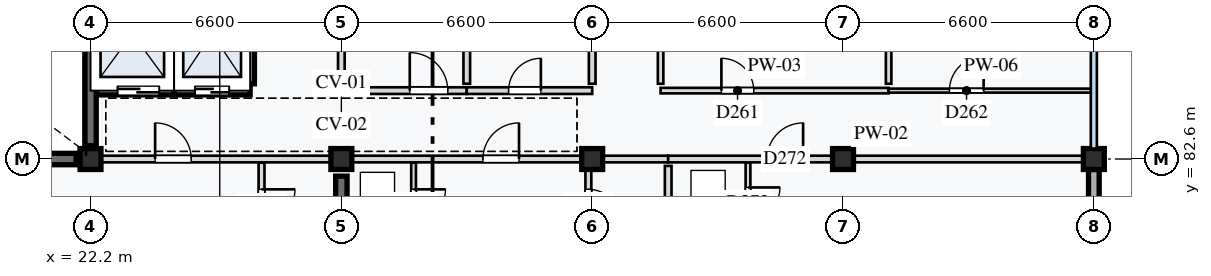
"""IFC4 building model, lengths in metres.
Left out: names, types, materials, properties, quantities, classifications, styles, units other than length and angle.
Written with IfcOpenShell. Run it as: python <this file> out.ifc"""

import sys

from ifc_helpers import new_model, si_unit, direction, frame, frame_2d, origin, origin_2d, place, context, subcontext, project, spatial, rectangle, extrude, element, fill, save


model = new_model("IFC4")
c1 = context("Model", 3, precision=1e-05, world=origin(), true_north=direction((0.0, 1.0)))
c2 = subcontext(c1, "Body", "Model", "MODEL_VIEW")
j1 = project(units=[si_unit("LENGTHUNIT", "METRE"), si_unit("PLANEANGLEUNIT", "RADIAN")], contexts=[c1])
p1 = place(None, origin())
s1 = spatial("IfcSite", under=j1, at=p1, CompositionType="ELEMENT")
p2 = place(p1, origin())
s2 = spatial("IfcBuilding", under=s1, at=p2, CompositionType="ELEMENT")
p3 = place(p2, frame((0.0, 0.0, 27.6)))
s3 = spatial("IfcBuildingStorey", under=s2, at=p3, CompositionType="ELEMENT", Elevation=27.6)
for number, where, z_axis, x_axis in (
    (1, (22.2, 82.6, 0.0), (0.0, 0.0, 1.0), (1.0, 0.0, 0.0)),
    (2, (28.8, 82.6, 0.0), (0.0, 0.0, 1.0), (1.0, 0.0, 0.0)),
    (3, (35.4, 82.6, 0.0), (0.0, 0.0, 1.0), (1.0, 0.0, 0.0)),
    (4, (42.0, 82.6, 0.0), (0.0, 0.0, 1.0), (1.0, 0.0, 0.0)),
    (5, (48.6, 82.6, 0.0), (0.0, 0.0, 1.0), (1.0, 0.0, 0.0)),
):
    element("IfcColumn", number, at=place(p3, frame(where, z_axis=z_axis, x_axis=x_axis)), inside=s3, PredefinedType="COLUMN", context=c2, shape_type="SweptSolid", body=[
        extrude(rectangle(XDim=0.55, YDim=0.55, at=origin_2d()), origin(), (0.0, 0.0, 1.0), 3.2),
    ])
p4 = place(p3, frame((15.98, 82.6, 0.0), z_axis=(0.0, 0.0, 1.0), x_axis=(1.0, 0.0, 0.0)))
e6 = element("IfcWall", 6, at=p4, inside=s3, PredefinedType="SHEAR", context=c2, shape_type="SweptSolid", body=[
    extrude(rectangle(XDim=5.84, YDim=0.3, at=frame_2d((2.92, 0.0))), origin(), (0.0, 0.0, 1.0), 2.97),
])
p5 = place(p3, frame((22.2, 82.95, 0.0), z_axis=(0.0, 0.0, 1.0), x_axis=(0.0, 1.0, 0.0)))
e7 = element("IfcWall", 7, at=p5, inside=s3, PredefinedType="SHEAR", context=c2, shape_type="SweptSolid", body=[
    extrude(rectangle(XDim=2.8, YDim=0.3, at=frame_2d((1.4, 0.0))), origin(), (0.0, 0.0, 1.0), 2.97),
])
p6 = place(p3, frame((28.8, 76.45, 0.0), z_axis=(0.0, 0.0, 1.0), x_axis=(0.0, 1.0, 0.0)))
e8 = element("IfcWall", 8, at=p6, inside=s3, PredefinedType="SHEAR", context=c2, shape_type="SweptSolid", body=[
    extrude(rectangle(XDim=5.7, YDim=0.3, at=frame_2d((2.85, 0.0))), origin(), (0.0, 0.0, 1.0), 2.97),
])
p7 = place(p3, frame((48.6, 76.275, 0.0), z_axis=(0.0, 0.0, 1.0), x_axis=(0.0, 1.0, 0.0)))
e9 = element("IfcWall", 9, at=p7, inside=s3, PredefinedType="STANDARD", context=c2, shape_type="SweptSolid", body=[
    extrude(rectangle(XDim=6.05, YDim=0.28, at=frame_2d((3.025, 0.0))), origin(), (0.0, 0.0, 1.0), 2.65),
])
p8 = place(p3, frame((22.36, 84.4, 0.0), z_axis=(0.0, 0.0, 1.0), x_axis=(1.0, 0.0, 0.0)))
e10 = element("IfcWall", 10, at=p8, inside=s3, PredefinedType="STANDARD", context=c2, shape_type="SweptSolid", body=[
    extrude(rectangle(XDim=2.04, YDim=0.225, at=frame_2d((1.02, 0.0))), origin(), (0.0, 0.0, 1.0), 2.97),
])
p9 = place(p8, frame((0.55, 0.0, 0.0)))
e11 = element("IfcOpeningElement", 11, at=p9, cuts=e10, PredefinedType="OPENING", context=c2, shape_type="SweptSolid", body=[
    extrude(rectangle(XDim=1.1, YDim=2.1, at=frame_2d((0.55, 1.05))), frame((0.0, 0.123, 0.0), z_axis=(0.0, -1.0, 0.0), x_axis=(1.0, 0.0, 0.0)), (0.0, 0.0, 1.0), 0.245),
])
p10 = place(p3, frame((24.4, 84.4, 0.0), z_axis=(0.0, 0.0, 1.0), x_axis=(1.0, 0.0, 0.0)))
e12 = element("IfcWall", 12, at=p10, inside=s3, PredefinedType="STANDARD", context=c2, shape_type="SweptSolid", body=[
    extrude(rectangle(XDim=2.0, YDim=0.225, at=frame_2d((1.0, 0.0))), origin(), (0.0, 0.0, 1.0), 2.97),
])
p11 = place(p10, frame((0.55, 0.0, 0.0)))
e13 = element("IfcOpeningElement", 13, at=p11, cuts=e12, PredefinedType="OPENING", context=c2, shape_type="SweptSolid", body=[
    extrude(rectangle(XDim=0.9, YDim=2.1, at=frame_2d((0.45, 1.05))), frame((0.0, 0.123, 0.0), z_axis=(0.0, -1.0, 0.0), x_axis=(1.0, 0.0, 0.0)), (0.0, 0.0, 1.0), 0.245),
])
for number, where, z_axis, x_axis in (
    (14, (24.4, 84.58, 0.0), (0.0, 0.0, 1.0), (0.0, 1.0, 0.0)),
    (15, (26.4, 84.58, 0.0), (0.0, 0.0, 1.0), (0.0, 1.0, 0.0)),
):
    element("IfcWall", number, at=place(p3, frame(where, z_axis=z_axis, x_axis=x_axis)), inside=s3, PredefinedType="STANDARD", context=c2, shape_type="SweptSolid", body=[
        extrude(rectangle(XDim=2.64, YDim=0.225, at=frame_2d((1.32, 0.0))), origin(), (0.0, 0.0, 1.0), 2.97),
    ])
p12 = place(p3, frame((28.8, 84.4, 0.0), z_axis=(0.0, 0.0, 1.0), x_axis=(1.0, 0.0, 0.0)))
e16 = element("IfcWall", 16, at=p12, inside=s3, PredefinedType="PARTITIONING", context=c2, shape_type="SweptSolid", body=[
    extrude(rectangle(XDim=3.3, YDim=0.175, at=frame_2d((1.65, 0.0))), origin(), (0.0, 0.0, 1.0), 2.97),
])
p13 = place(p12, frame((1.8, 0.0, 0.0)))
e17 = element("IfcOpeningElement", 17, at=p13, cuts=e16, PredefinedType="OPENING", context=c2, shape_type="SweptSolid", body=[
    extrude(rectangle(XDim=1.0, YDim=2.16, at=frame_2d((0.5, 1.08))), frame((0.0, 0.097, 0.0), z_axis=(0.0, -1.0, 0.0), x_axis=(1.0, 0.0, 0.0)), (0.0, 0.0, 1.0), 0.195),
])
p14 = place(p3, frame((32.1, 84.4, 0.0), z_axis=(0.0, 0.0, 1.0), x_axis=(1.0, 0.0, 0.0)))
e18 = element("IfcWall", 18, at=p14, inside=s3, PredefinedType="PARTITIONING", context=c2, shape_type="SweptSolid", body=[
    extrude(rectangle(XDim=3.3, YDim=0.175, at=frame_2d((1.65, 0.0))), origin(), (0.0, 0.0, 1.0), 2.97),
])
p15 = place(p14, frame((1.1, 0.0, 0.0)))
e19 = element("IfcOpeningElement", 19, at=p15, cuts=e18, PredefinedType="OPENING", context=c2, shape_type="SweptSolid", body=[
    extrude(rectangle(XDim=0.85, YDim=2.0, at=frame_2d((0.425, 1.0))), frame((0.0, 0.097, 0.0), z_axis=(0.0, -1.0, 0.0), x_axis=(1.0, 0.0, 0.0)), (0.0, 0.0, 1.0), 0.195),
])
for number, where, z_axis, x_axis in (
    (20, (28.8, 84.58, 0.0), (0.0, 0.0, 1.0), (0.0, 1.0, 0.0)),
    (21, (32.1, 84.58, 0.0), (0.0, 0.0, 1.0), (0.0, 1.0, 0.0)),
    (22, (35.4, 84.58, 0.0), (0.0, 0.0, 1.0), (0.0, 1.0, 0.0)),
):
    element("IfcWall", number, at=place(p3, frame(where, z_axis=z_axis, x_axis=x_axis)), inside=s3, PredefinedType="PARTITIONING", context=c2, shape_type="SweptSolid", body=[
        extrude(rectangle(XDim=1.14, YDim=0.175, at=frame_2d((0.57, 0.0))), origin(), (0.0, 0.0, 1.0), 2.97),
    ])
p16 = place(p3, frame((37.2, 84.4, 0.0), z_axis=(0.0, 0.0, 1.0), x_axis=(1.0, 0.0, 0.0)))
e23 = element("IfcWall", 23, at=p16, inside=s3, PredefinedType="PARTITIONING", context=c2, shape_type="SweptSolid", body=[
    extrude(rectangle(XDim=6.0, YDim=0.145, at=frame_2d((3.0, 0.0))), origin(), (0.0, 0.0, 1.0), 2.97),
])
p17 = place(p16, frame((1.6, 0.0, 0.0)))
e24 = element("IfcOpeningElement", 24, at=p17, cuts=e23, PredefinedType="OPENING", context=c2, shape_type="SweptSolid", body=[
    extrude(rectangle(XDim=0.85, YDim=2.1, at=frame_2d((0.425, 1.05))), frame((0.0, 0.083, 0.0), z_axis=(0.0, -1.0, 0.0), x_axis=(1.0, 0.0, 0.0)), (0.0, 0.0, 1.0), 0.165),
])
p18 = place(p3, frame((43.2, 84.4, 0.0), z_axis=(0.0, 0.0, 1.0), x_axis=(1.0, 0.0, 0.0)))
e25 = element("IfcWall", 25, at=p18, inside=s3, PredefinedType="PARTITIONING", context=c2, shape_type="SweptSolid", body=[
    extrude(rectangle(XDim=5.4, YDim=0.105, at=frame_2d((2.7, 0.0))), origin(), (0.0, 0.0, 1.0), 2.97),
])
p19 = place(p18, frame((1.6, 0.0, 0.0)))
e26 = element("IfcOpeningElement", 26, at=p19, cuts=e25, PredefinedType="OPENING", context=c2, shape_type="SweptSolid", body=[
    extrude(rectangle(XDim=0.9, YDim=2.1, at=frame_2d((0.45, 1.05))), frame((0.0, 0.062, 0.0), z_axis=(0.0, -1.0, 0.0), x_axis=(1.0, 0.0, 0.0)), (0.0, 0.0, 1.0), 0.125),
])
for number, where, z_axis, x_axis in (
    (27, (43.2, 84.58, 0.0), (0.0, 0.0, 1.0), (0.0, 1.0, 0.0)),
    (28, (37.2, 84.58, 0.0), (0.0, 0.0, 1.0), (0.0, 1.0, 0.0)),
):
    element("IfcWall", number, at=place(p3, frame(where, z_axis=z_axis, x_axis=x_axis)), inside=s3, PredefinedType="PARTITIONING", context=c2, shape_type="SweptSolid", body=[
        extrude(rectangle(XDim=2.64, YDim=0.145, at=frame_2d((1.32, 0.0))), origin(), (0.0, 0.0, 1.0), 2.97),
    ])
p20 = place(p3, frame((22.2, 82.6, 0.0), z_axis=(0.0, 0.0, 1.0), x_axis=(1.0, 0.0, 0.0)))
e29 = element("IfcWall", 29, at=p20, inside=s3, PredefinedType="PARTITIONING", context=c2, shape_type="SweptSolid", body=[
    extrude(rectangle(XDim=6.6, YDim=0.175, at=frame_2d((3.3, 0.0))), origin(), (0.0, 0.0, 1.0), 2.55),
])
p21 = place(p20, frame((1.7, 0.0, 0.0)))
e30 = element("IfcOpeningElement", 30, at=p21, cuts=e29, PredefinedType="OPENING", context=c2, shape_type="SweptSolid", body=[
    extrude(rectangle(XDim=0.95, YDim=2.1, at=frame_2d((0.475, 1.05))), frame((0.0, 0.097, 0.0), z_axis=(0.0, -1.0, 0.0), x_axis=(1.0, 0.0, 0.0)), (0.0, 0.0, 1.0), 0.195),
])
p22 = place(p3, frame((26.7, 82.502, 0.0), z_axis=(0.0, 0.0, 1.0), x_axis=(0.0, -1.0, 0.0)))
e31 = element("IfcWall", 31, at=p22, inside=s3, PredefinedType="PARTITIONING", context=c2, shape_type="SweptSolid", body=[
    extrude(rectangle(XDim=2.302, YDim=0.155, at=frame_2d((1.151, 0.0))), origin(), (0.0, 0.0, 1.0), 2.97),
])
p23 = place(p22, frame((0.7, 0.0, 0.0)))
e32 = element("IfcOpeningElement", 32, at=p23, cuts=e31, PredefinedType="OPENING", context=c2, shape_type="SweptSolid", body=[
    extrude(rectangle(XDim=0.88, YDim=2.1, at=frame_2d((0.44, 1.05))), frame((0.0, 0.087, 0.0), z_axis=(0.0, -1.0, 0.0), x_axis=(1.0, 0.0, 0.0)), (0.0, 0.0, 1.0), 0.175),
])
p24 = place(p3, frame((28.8, 82.6, 0.0), z_axis=(0.0, 0.0, 1.0), x_axis=(1.0, 0.0, 0.0)))
e33 = element("IfcWall", 33, at=p24, inside=s3, PredefinedType="PARTITIONING", context=c2, shape_type="SweptSolid", body=[
    extrude(rectangle(XDim=8.6, YDim=0.175, at=frame_2d((4.3, 0.0))), origin(), (0.0, 0.0, 1.0), 2.55),
])
p25 = place(p24, frame((3.725, 0.0, 0.0)))
e34 = element("IfcOpeningElement", 34, at=p25, cuts=e33, PredefinedType="OPENING", context=c2, shape_type="SweptSolid", body=[
    extrude(rectangle(XDim=0.95, YDim=2.16, at=frame_2d((0.475, 1.08))), frame((0.0, 0.097, 0.0), z_axis=(0.0, -1.0, 0.0), x_axis=(1.0, 0.0, 0.0)), (0.0, 0.0, 1.0), 0.195),
])
p26 = place(p3, frame((30.7, 82.502, 0.0), z_axis=(0.0, 0.0, 1.0), x_axis=(0.0, -1.0, 0.0)))
e35 = element("IfcWall", 35, at=p26, inside=s3, PredefinedType="PARTITIONING", context=c2, shape_type="SweptSolid", body=[
    extrude(rectangle(XDim=2.302, YDim=0.125, at=frame_2d((1.151, 0.0))), origin(), (0.0, 0.0, 1.0), 2.97),
])
p27 = place(p26, frame((0.7, 0.0, 0.0)))
e36 = element("IfcOpeningElement", 36, at=p27, cuts=e35, PredefinedType="OPENING", context=c2, shape_type="SweptSolid", body=[
    extrude(rectangle(XDim=0.84, YDim=2.06, at=frame_2d((0.42, 1.03))), frame((0.0, 0.073, 0.0), z_axis=(0.0, -1.0, 0.0), x_axis=(1.0, 0.0, 0.0)), (0.0, 0.0, 1.0), 0.145),
])
p28 = place(p3, frame((35.3, 82.502, 0.0), z_axis=(0.0, 0.0, 1.0), x_axis=(0.0, -1.0, 0.0)))
e37 = element("IfcWall", 37, at=p28, inside=s3, PredefinedType="PARTITIONING", context=c2, shape_type="SweptSolid", body=[
    extrude(rectangle(XDim=2.302, YDim=0.155, at=frame_2d((1.151, 0.0))), origin(), (0.0, 0.0, 1.0), 2.97),
])
p29 = place(p28, frame((0.7, 0.0, 0.0)))
e38 = element("IfcOpeningElement", 38, at=p29, cuts=e37, PredefinedType="OPENING", context=c2, shape_type="SweptSolid", body=[
    extrude(rectangle(XDim=0.85, YDim=2.1, at=frame_2d((0.425, 1.05))), frame((0.0, 0.087, 0.0), z_axis=(0.0, -1.0, 0.0), x_axis=(1.0, 0.0, 0.0)), (0.0, 0.0, 1.0), 0.175),
])
p30 = place(p3, frame((37.4, 82.42, 0.0), z_axis=(0.0, 0.0, 1.0), x_axis=(0.0, -1.0, 0.0)))
e39 = element("IfcWall", 39, at=p30, inside=s3, PredefinedType="PARTITIONING", context=c2, shape_type="SweptSolid", body=[
    extrude(rectangle(XDim=2.132, YDim=0.175, at=frame_2d((1.066, 0.0))), origin(), (0.0, 0.0, 1.0), 2.97),
])
p31 = place(p3, frame((37.4, 82.6, 0.0), z_axis=(0.0, 0.0, 1.0), x_axis=(1.0, 0.0, 0.0)))
e40 = element("IfcWall", 40, at=p31, inside=s3, PredefinedType="PARTITIONING", context=c2, shape_type="SweptSolid", body=[
    extrude(rectangle(XDim=11.2, YDim=0.175, at=frame_2d((5.6, 0.0))), origin(), (0.0, 0.0, 1.0), 2.55),
])
p32 = place(p31, frame((2.6, 0.0, 0.0)))
e41 = element("IfcOpeningElement", 41, at=p32, cuts=e40, PredefinedType="OPENING", context=c2, shape_type="SweptSolid", body=[
    extrude(rectangle(XDim=0.95, YDim=2.16, at=frame_2d((0.475, 1.08))), frame((0.0, 0.097, 0.0), z_axis=(0.0, -1.0, 0.0), x_axis=(1.0, 0.0, 0.0)), (0.0, 0.0, 1.0), 0.195),
])
p33 = place(p3, frame((39.5, 82.502, 0.0), z_axis=(0.0, 0.0, 1.0), x_axis=(0.0, -1.0, 0.0)))
e42 = element("IfcWall", 42, at=p33, inside=s3, PredefinedType="PARTITIONING", context=c2, shape_type="SweptSolid", body=[
    extrude(rectangle(XDim=2.202, YDim=0.125, at=frame_2d((1.101, 0.0))), origin(), (0.0, 0.0, 1.0), 2.97),
])
p34 = place(p33, frame((0.65, 0.0, 0.0)))
e43 = element("IfcOpeningElement", 43, at=p34, cuts=e42, PredefinedType="OPENING", context=c2, shape_type="SweptSolid", body=[
    extrude(rectangle(XDim=0.84, YDim=2.06, at=frame_2d((0.42, 1.03))), frame((0.0, 0.073, 0.0), z_axis=(0.0, -1.0, 0.0), x_axis=(1.0, 0.0, 0.0)), (0.0, 0.0, 1.0), 0.145),
])
p35 = place(p9, origin())
e44 = element("IfcDoor", 44, at=p35, inside=s3, OperationType="DOUBLE_DOOR_SLIDING", PredefinedType="DOOR", context=c2, shape_type="SweptSolid", body=[
    extrude(rectangle(XDim=1.1, YDim=2.1, at=frame_2d((0.55, 1.05))), frame((0.0, 0.025, 0.0), z_axis=(0.0, -1.0, 0.0), x_axis=(1.0, 0.0, 0.0)), (0.0, 0.0, 1.0), 0.05),
])
fill(e11, e44)
p36 = place(p11, origin())
e45 = element("IfcDoor", 45, at=p36, inside=s3, OperationType="DOUBLE_DOOR_SLIDING", PredefinedType="DOOR", context=c2, shape_type="SweptSolid", body=[
    extrude(rectangle(XDim=0.9, YDim=2.1, at=frame_2d((0.45, 1.05))), frame((0.0, 0.025, 0.0), z_axis=(0.0, -1.0, 0.0), x_axis=(1.0, 0.0, 0.0)), (0.0, 0.0, 1.0), 0.05),
])
fill(e13, e45)
p37 = place(p13, origin())
e46 = element("IfcDoor", 46, at=p37, inside=s3, OperationType="SINGLE_SWING_LEFT", PredefinedType="DOOR", context=c2, shape_type="SweptSolid", body=[
    extrude(rectangle(XDim=1.0, YDim=2.16, at=frame_2d((0.5, 1.08))), frame((0.0, 0.025, 0.0), z_axis=(0.0, -1.0, 0.0), x_axis=(1.0, 0.0, 0.0)), (0.0, 0.0, 1.0), 0.05),
])
fill(e17, e46)
p38 = place(p15, origin())
e47 = element("IfcDoor", 47, at=p38, inside=s3, OperationType="SINGLE_SWING_RIGHT", PredefinedType="DOOR", context=c2, shape_type="SweptSolid", body=[
    extrude(rectangle(XDim=0.85, YDim=2.0, at=frame_2d((0.425, 1.0))), frame((0.0, 0.025, 0.0), z_axis=(0.0, -1.0, 0.0), x_axis=(1.0, 0.0, 0.0)), (0.0, 0.0, 1.0), 0.05),
])
fill(e19, e47)
p39 = place(p17, origin())
e48 = element("IfcDoor", 48, at=p39, inside=s3, OperationType="SINGLE_SWING_LEFT", PredefinedType="DOOR", context=c2, shape_type="SweptSolid", body=[
    extrude(rectangle(XDim=0.85, YDim=2.1, at=frame_2d((0.425, 1.05))), frame((0.0, 0.025, 0.0), z_axis=(0.0, -1.0, 0.0), x_axis=(1.0, 0.0, 0.0)), (0.0, 0.0, 1.0), 0.05),
])
fill(e24, e48)
p40 = place(p19, origin())
e49 = element("IfcDoor", 49, at=p40, inside=s3, OperationType="SINGLE_SWING_RIGHT", PredefinedType="DOOR", context=c2, shape_type="SweptSolid", body=[
    extrude(rectangle(XDim=0.9, YDim=2.1, at=frame_2d((0.45, 1.05))), frame((0.0, 0.025, 0.0), z_axis=(0.0, -1.0, 0.0), x_axis=(1.0, 0.0, 0.0)), (0.0, 0.0, 1.0), 0.05),
])
fill(e26, e49)
p41 = place(p21, origin())
e50 = element("IfcDoor", 50, at=p41, inside=s3, OperationType="SINGLE_SWING_LEFT", PredefinedType="DOOR", context=c2, shape_type="SweptSolid", body=[
    extrude(rectangle(XDim=0.95, YDim=2.1, at=frame_2d((0.475, 1.05))), frame((0.0, 0.025, 0.0), z_axis=(0.0, -1.0, 0.0), x_axis=(1.0, 0.0, 0.0)), (0.0, 0.0, 1.0), 0.05),
])
fill(e30, e50)
p42 = place(p23, origin())
e51 = element("IfcDoor", 51, at=p42, inside=s3, OperationType="SINGLE_SWING_LEFT", PredefinedType="DOOR", context=c2, shape_type="SweptSolid", body=[
    extrude(rectangle(XDim=0.88, YDim=2.1, at=frame_2d((0.44, 1.05))), frame((0.0, 0.025, 0.0), z_axis=(0.0, -1.0, 0.0), x_axis=(1.0, 0.0, 0.0)), (0.0, 0.0, 1.0), 0.05),
])
fill(e32, e51)
p43 = place(p25, origin())
e52 = element("IfcDoor", 52, at=p43, inside=s3, OperationType="SINGLE_SWING_RIGHT", PredefinedType="DOOR", context=c2, shape_type="SweptSolid", body=[
    extrude(rectangle(XDim=0.95, YDim=2.16, at=frame_2d((0.475, 1.08))), frame((0.0, 0.025, 0.0), z_axis=(0.0, -1.0, 0.0), x_axis=(1.0, 0.0, 0.0)), (0.0, 0.0, 1.0), 0.05),
])
fill(e34, e52)
p44 = place(p27, origin())
e53 = element("IfcDoor", 53, at=p44, inside=s3, OperationType="SINGLE_SWING_LEFT", PredefinedType="DOOR", context=c2, shape_type="SweptSolid", body=[
    extrude(rectangle(XDim=0.84, YDim=2.06, at=frame_2d((0.42, 1.03))), frame((0.0, 0.025, 0.0), z_axis=(0.0, -1.0, 0.0), x_axis=(1.0, 0.0, 0.0)), (0.0, 0.0, 1.0), 0.05),
])
fill(e36, e53)
p45 = place(p29, origin())
e54 = element("IfcDoor", 54, at=p45, inside=s3, OperationType="SINGLE_SWING_RIGHT", PredefinedType="DOOR", context=c2, shape_type="SweptSolid", body=[
    extrude(rectangle(XDim=0.85, YDim=2.1, at=frame_2d((0.425, 1.05))), frame((0.0, 0.025, 0.0), z_axis=(0.0, -1.0, 0.0), x_axis=(1.0, 0.0, 0.0)), (0.0, 0.0, 1.0), 0.05),
])
fill(e38, e54)
p46 = place(p32, origin())
e55 = element("IfcDoor", 55, at=p46, inside=s3, OperationType="SINGLE_SWING_RIGHT", PredefinedType="DOOR", context=c2, shape_type="SweptSolid", body=[
    extrude(rectangle(XDim=0.95, YDim=2.16, at=frame_2d((0.475, 1.08))), frame((0.0, 0.025, 0.0), z_axis=(0.0, -1.0, 0.0), x_axis=(1.0, 0.0, 0.0)), (0.0, 0.0, 1.0), 0.05),
])
fill(e41, e55)
p47 = place(p34, origin())
e56 = element("IfcDoor", 56, at=p47, inside=s3, OperationType="SINGLE_SWING_LEFT", PredefinedType="DOOR", context=c2, shape_type="SweptSolid", body=[
    extrude(rectangle(XDim=0.84, YDim=2.06, at=frame_2d((0.42, 1.03))), frame((0.0, 0.025, 0.0), z_axis=(0.0, -1.0, 0.0), x_axis=(1.0, 0.0, 0.0)), (0.0, 0.0, 1.0), 0.05),
])
fill(e43, e56)
save(model, sys.argv[1])
